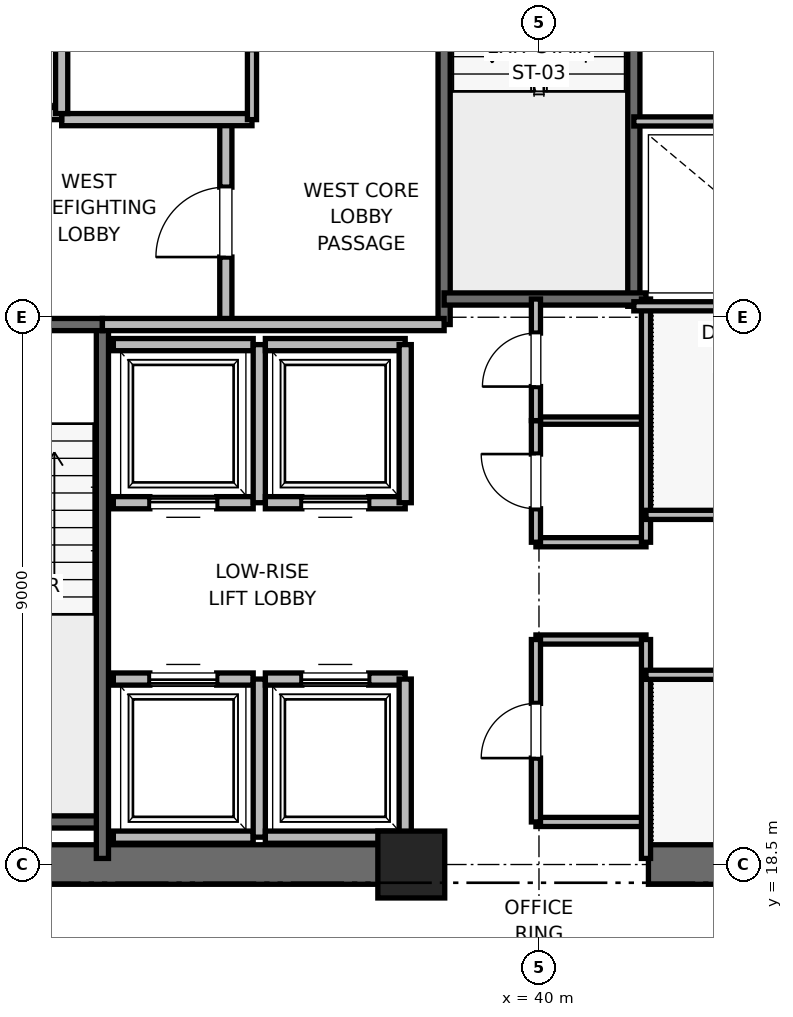
"""IFC4 building model, lengths in metres.
Left out: names, types, materials, properties, quantities, classifications, styles, units other than length and angle.
Written with IfcOpenShell. Run it as: python <this file> out.ifc"""

import sys

from ifc_helpers import new_model, si_unit, direction, frame, frame_2d, origin, origin_2d, place, context, subcontext, project, spatial, rectangle, extrude, element, fill, save


model = new_model("IFC4")
c1 = context("Model", 3, precision=1e-05, world=origin(), true_north=direction((0.0, 1.0)))
c2 = subcontext(c1, "Body", "Model", "MODEL_VIEW")
j1 = project(units=[si_unit("LENGTHUNIT", "METRE"), si_unit("PLANEANGLEUNIT", "RADIAN")], contexts=[c1])
p1 = place(None, origin())
s1 = spatial("IfcSite", under=j1, at=p1, CompositionType="ELEMENT")
p2 = place(p1, origin())
s2 = spatial("IfcBuilding", under=s1, at=p2, CompositionType="ELEMENT")
p3 = place(p2, frame((0.0, 0.0, 55.6)))
s3 = spatial("IfcBuildingStorey", under=s2, at=p3, CompositionType="ELEMENT", Elevation=55.6)
p4 = place(p3, frame((37.9, 18.5, 0.0), z_axis=(0.0, 0.0, 1.0), x_axis=(1.0, 0.0, 0.0)))
e1 = element("IfcColumn", 1, at=p4, inside=s3, PredefinedType="PILASTER", context=c2, shape_type="SweptSolid", body=[
    extrude(rectangle(XDim=1.1, YDim=1.1, at=origin_2d()), origin(), (0.0, 0.0, 1.0), 4.0),
])
for number, where, z_axis, x_axis in (
    (2, (29.0, 18.5, 0.0), (0.0, 0.0, 1.0), (1.0, 0.0, 0.0)),
    (3, (41.8, 18.5, 0.0), (0.0, 0.0, 1.0), (1.0, 0.0, 0.0)),
):
    element("IfcWall", number, at=place(p3, frame(where, z_axis=z_axis, x_axis=x_axis)), inside=s3, PredefinedType="SHEAR", context=c2, shape_type="SweptSolid", body=[
        extrude(rectangle(XDim=9.2, YDim=0.65, at=frame_2d((4.6, 0.0))), origin(), (0.0, 0.0, 1.0), 3.76),
    ])
p5 = place(p3, frame((29.7, 19.2, 0.0), z_axis=(0.0, 0.0, 1.0), x_axis=(1.0, 0.0, 0.0)))
e4 = element("IfcWall", 4, at=p5, inside=s3, PredefinedType="SOLIDWALL", context=c2, shape_type="SweptSolid", body=[
    extrude(rectangle(XDim=3.12, YDim=0.2, at=frame_2d((1.56, 0.0))), origin(), (0.0, 0.0, 1.0), 3.76),
])
p6 = place(p3, frame((32.82, 18.6, 0.0), z_axis=(0.0, 0.0, 1.0), x_axis=(0.0, 1.0, 0.0)))
e5 = element("IfcWall", 5, at=p6, inside=s3, PredefinedType="SOLIDWALL", context=c2, shape_type="SweptSolid", body=[
    extrude(rectangle(XDim=8.78, YDim=0.2, at=frame_2d((4.39, 0.0))), origin(), (0.0, 0.0, 1.0), 3.76),
])
p7 = place(p3, frame((29.7, 27.38, 0.0), z_axis=(0.0, 0.0, 1.0), x_axis=(1.0, 0.0, 0.0)))
e6 = element("IfcWall", 6, at=p7, inside=s3, PredefinedType="SOLIDWALL", context=c2, shape_type="SweptSolid", body=[
    extrude(rectangle(XDim=3.12, YDim=0.2, at=frame_2d((1.56, 0.0))), origin(), (0.0, 0.0, 1.0), 3.76),
])
p8 = place(p7, frame((1.01, 0.0, 0.0)))
e7 = element("IfcOpeningElement", 7, at=p8, cuts=e6, PredefinedType="OPENING", context=c2, shape_type="SweptSolid", body=[
    extrude(rectangle(XDim=1.1, YDim=2.15, at=frame_2d((0.55, 1.075))), frame((0.0, 0.1, 0.0), z_axis=(0.0, -1.0, 0.0), x_axis=(1.0, 0.0, 0.0)), (0.0, 0.0, 1.0), 0.2),
])
p9 = place(p3, frame((38.44, 27.38, 0.0), z_axis=(0.0, 0.0, 1.0), x_axis=(0.0, 1.0, 0.0)))
e8 = element("IfcWall", 8, at=p9, inside=s3, PredefinedType="SOLIDWALL", context=c2, shape_type="SweptSolid", body=[
    extrude(rectangle(XDim=8.87, YDim=0.2, at=frame_2d((4.435, 0.0))), origin(), (0.0, 0.0, 1.0), 3.76),
])
p10 = place(p3, frame((41.56, 27.68, 0.0), z_axis=(0.0, 0.0, 1.0), x_axis=(0.0, 1.0, 0.0)))
e9 = element("IfcWall", 9, at=p10, inside=s3, PredefinedType="SOLIDWALL", context=c2, shape_type="SweptSolid", body=[
    extrude(rectangle(XDim=8.57, YDim=0.2, at=frame_2d((4.285, 0.0))), origin(), (0.0, 0.0, 1.0), 3.76),
])
p11 = place(p3, frame((38.44, 27.8, 0.0), z_axis=(0.0, 0.0, 1.0), x_axis=(1.0, 0.0, 0.0)))
e10 = element("IfcWall", 10, at=p11, inside=s3, PredefinedType="SOLIDWALL", context=c2, shape_type="SweptSolid", body=[
    extrude(rectangle(XDim=3.32, YDim=0.2, at=frame_2d((1.66, 0.0))), origin(), (0.0, 0.0, 1.0), 3.76),
])
p12 = place(p3, frame((34.85, 27.38, 0.0), z_axis=(0.0, 0.0, 1.0), x_axis=(0.0, 1.0, 0.0)))
e11 = element("IfcWall", 11, at=p12, inside=s3, PredefinedType="PARTITIONING", context=c2, shape_type="SweptSolid", body=[
    extrude(rectangle(XDim=3.37, YDim=0.2, at=frame_2d((1.685, 0.0))), origin(), (0.0, 0.0, 1.0), 3.76),
])
p13 = place(p12, frame((1.11, 0.0, 0.0)))
e12 = element("IfcOpeningElement", 12, at=p13, cuts=e11, PredefinedType="OPENING", context=c2, shape_type="SweptSolid", body=[
    extrude(rectangle(XDim=1.15, YDim=2.2, at=frame_2d((0.575, 1.1))), frame((0.0, 0.1, 0.0), z_axis=(0.0, -1.0, 0.0), x_axis=(1.0, 0.0, 0.0)), (0.0, 0.0, 1.0), 0.2),
])
p14 = place(p3, frame((32.82, 27.38, 0.0), z_axis=(0.0, 0.0, 1.0), x_axis=(1.0, 0.0, 0.0)))
e13 = element("IfcWall", 13, at=p14, inside=s3, PredefinedType="PARTITIONING", context=c2, shape_type="SweptSolid", body=[
    extrude(rectangle(XDim=5.62, YDim=0.2, at=frame_2d((2.81, 0.0))), origin(), (0.0, 0.0, 1.0), 3.76),
])
p15 = place(p3, frame((32.15, 30.75, 0.0), z_axis=(0.0, 0.0, 1.0), x_axis=(1.0, 0.0, 0.0)))
e14 = element("IfcWall", 14, at=p15, inside=s3, PredefinedType="PARTITIONING", context=c2, shape_type="SweptSolid", body=[
    extrude(rectangle(XDim=3.13, YDim=0.2, at=frame_2d((1.565, 0.0))), origin(), (0.0, 0.0, 1.0), 3.76),
])
p16 = place(p3, frame((29.55, 30.85, 0.0), z_axis=(0.0, 0.0, 1.0), x_axis=(1.0, 0.0, 0.0)))
e15 = element("IfcWall", 15, at=p16, inside=s3, PredefinedType="SOLIDWALL", context=c2, shape_type="SweptSolid", body=[
    extrude(rectangle(XDim=2.6, YDim=0.2, at=frame_2d((1.3, 0.0))), origin(), (0.0, 0.0, 1.0), 2.54),
])
p17 = place(p16, frame((0.75, 0.0, 0.0)))
e16 = element("IfcOpeningElement", 16, at=p17, cuts=e15, PredefinedType="OPENING", context=c2, shape_type="SweptSolid", body=[
    extrude(rectangle(XDim=1.1, YDim=2.2, at=frame_2d((0.55, 1.1))), frame((0.0, 0.1, 0.0), z_axis=(0.0, -1.0, 0.0), x_axis=(1.0, 0.0, 0.0)), (0.0, 0.0, 1.0), 0.2),
])
p18 = place(p3, frame((32.15, 30.85, 0.0), z_axis=(0.0, 0.0, 1.0), x_axis=(0.0, 1.0, 0.0)))
e17 = element("IfcWall", 17, at=p18, inside=s3, PredefinedType="SOLIDWALL", context=c2, shape_type="SweptSolid", body=[
    extrude(rectangle(XDim=3.0, YDim=0.2, at=frame_2d((1.5, 0.0))), origin(), (0.0, 0.0, 1.0), 3.76),
])
p19 = place(p3, frame((33.0, 18.95, 0.0), z_axis=(0.0, 0.0, 1.0), x_axis=(1.0, 0.0, 0.0)))
e18 = element("IfcWall", 18, at=p19, inside=s3, PredefinedType="SOLIDWALL", context=c2, shape_type="SweptSolid", body=[
    extrude(rectangle(XDim=2.3, YDim=0.2, at=frame_2d((1.15, 0.0))), origin(), (0.0, 0.0, 1.0), 3.76),
])
p20 = place(p3, frame((35.3, 21.55, 0.0), z_axis=(0.0, 0.0, 1.0), x_axis=(-1.0, 0.0, 0.0)))
e19 = element("IfcWall", 19, at=p20, inside=s3, PredefinedType="SOLIDWALL", context=c2, shape_type="SweptSolid", body=[
    extrude(rectangle(XDim=2.3, YDim=0.2, at=frame_2d((1.15, 0.0))), origin(), (0.0, 0.0, 1.0), 3.76),
])
p21 = place(p20, frame((0.6, 0.0, 0.0)))
e20 = element("IfcOpeningElement", 20, at=p21, cuts=e19, PredefinedType="OPENING", context=c2, shape_type="SweptSolid", body=[
    extrude(rectangle(XDim=1.1, YDim=2.2, at=frame_2d((0.55, 1.1))), frame((0.0, 0.1, 0.0), z_axis=(0.0, -1.0, 0.0), x_axis=(1.0, 0.0, 0.0)), (0.0, 0.0, 1.0), 0.2),
])
p22 = place(p3, frame((35.4, 18.95, 0.0), z_axis=(0.0, 0.0, 1.0), x_axis=(0.0, 1.0, 0.0)))
e21 = element("IfcWall", 21, at=p22, inside=s3, PredefinedType="SOLIDWALL", context=c2, shape_type="SweptSolid", body=[
    extrude(rectangle(XDim=2.6, YDim=0.2, at=frame_2d((1.3, 0.0))), origin(), (0.0, 0.0, 1.0), 3.76),
])
p23 = place(p3, frame((35.5, 18.95, 0.0), z_axis=(0.0, 0.0, 1.0), x_axis=(1.0, 0.0, 0.0)))
e22 = element("IfcWall", 22, at=p23, inside=s3, PredefinedType="SOLIDWALL", context=c2, shape_type="SweptSolid", body=[
    extrude(rectangle(XDim=2.3, YDim=0.2, at=frame_2d((1.15, 0.0))), origin(), (0.0, 0.0, 1.0), 2.54),
])
p24 = place(p3, frame((37.8, 21.55, 0.0), z_axis=(0.0, 0.0, 1.0), x_axis=(-1.0, 0.0, 0.0)))
e23 = element("IfcWall", 23, at=p24, inside=s3, PredefinedType="SOLIDWALL", context=c2, shape_type="SweptSolid", body=[
    extrude(rectangle(XDim=2.3, YDim=0.2, at=frame_2d((1.15, 0.0))), origin(), (0.0, 0.0, 1.0), 3.76),
])
p25 = place(p24, frame((0.6, 0.0, 0.0)))
e24 = element("IfcOpeningElement", 24, at=p25, cuts=e23, PredefinedType="OPENING", context=c2, shape_type="SweptSolid", body=[
    extrude(rectangle(XDim=1.1, YDim=2.2, at=frame_2d((0.55, 1.1))), frame((0.0, 0.1, 0.0), z_axis=(0.0, -1.0, 0.0), x_axis=(1.0, 0.0, 0.0)), (0.0, 0.0, 1.0), 0.2),
])
p26 = place(p3, frame((37.8, 18.95, 0.0), z_axis=(0.0, 0.0, 1.0), x_axis=(0.0, 1.0, 0.0)))
e25 = element("IfcWall", 25, at=p26, inside=s3, PredefinedType="SOLIDWALL", context=c2, shape_type="SweptSolid", body=[
    extrude(rectangle(XDim=2.6, YDim=0.2, at=frame_2d((1.3, 0.0))), origin(), (0.0, 0.0, 1.0), 2.54),
])
p27 = place(p3, frame((33.0, 24.45, 0.0), z_axis=(0.0, 0.0, 1.0), x_axis=(1.0, 0.0, 0.0)))
e26 = element("IfcWall", 26, at=p27, inside=s3, PredefinedType="SOLIDWALL", context=c2, shape_type="SweptSolid", body=[
    extrude(rectangle(XDim=2.3, YDim=0.2, at=frame_2d((1.15, 0.0))), origin(), (0.0, 0.0, 1.0), 3.76),
])
p28 = place(p27, frame((0.6, 0.0, 0.0)))
e27 = element("IfcOpeningElement", 27, at=p28, cuts=e26, PredefinedType="OPENING", context=c2, shape_type="SweptSolid", body=[
    extrude(rectangle(XDim=1.1, YDim=2.2, at=frame_2d((0.55, 1.1))), frame((0.0, 0.1, 0.0), z_axis=(0.0, -1.0, 0.0), x_axis=(1.0, 0.0, 0.0)), (0.0, 0.0, 1.0), 0.2),
])
p29 = place(p3, frame((35.3, 27.05, 0.0), z_axis=(0.0, 0.0, 1.0), x_axis=(-1.0, 0.0, 0.0)))
e28 = element("IfcWall", 28, at=p29, inside=s3, PredefinedType="SOLIDWALL", context=c2, shape_type="SweptSolid", body=[
    extrude(rectangle(XDim=2.3, YDim=0.2, at=frame_2d((1.15, 0.0))), origin(), (0.0, 0.0, 1.0), 3.76),
])
p30 = place(p3, frame((35.4, 24.45, 0.0), z_axis=(0.0, 0.0, 1.0), x_axis=(0.0, 1.0, 0.0)))
e29 = element("IfcWall", 29, at=p30, inside=s3, PredefinedType="SOLIDWALL", context=c2, shape_type="SweptSolid", body=[
    extrude(rectangle(XDim=2.6, YDim=0.2, at=frame_2d((1.3, 0.0))), origin(), (0.0, 0.0, 1.0), 3.76),
])
p31 = place(p3, frame((35.5, 24.45, 0.0), z_axis=(0.0, 0.0, 1.0), x_axis=(1.0, 0.0, 0.0)))
e30 = element("IfcWall", 30, at=p31, inside=s3, PredefinedType="SOLIDWALL", context=c2, shape_type="SweptSolid", body=[
    extrude(rectangle(XDim=2.3, YDim=0.2, at=frame_2d((1.15, 0.0))), origin(), (0.0, 0.0, 1.0), 3.76),
])
p32 = place(p31, frame((0.6, 0.0, 0.0)))
e31 = element("IfcOpeningElement", 31, at=p32, cuts=e30, PredefinedType="OPENING", context=c2, shape_type="SweptSolid", body=[
    extrude(rectangle(XDim=1.1, YDim=2.2, at=frame_2d((0.55, 1.1))), frame((0.0, 0.1, 0.0), z_axis=(0.0, -1.0, 0.0), x_axis=(1.0, 0.0, 0.0)), (0.0, 0.0, 1.0), 0.2),
])
p33 = place(p3, frame((37.8, 27.05, 0.0), z_axis=(0.0, 0.0, 1.0), x_axis=(-1.0, 0.0, 0.0)))
e32 = element("IfcWall", 32, at=p33, inside=s3, PredefinedType="SOLIDWALL", context=c2, shape_type="SweptSolid", body=[
    extrude(rectangle(XDim=2.3, YDim=0.2, at=frame_2d((1.15, 0.0))), origin(), (0.0, 0.0, 1.0), 3.76),
])
p34 = place(p3, frame((37.8, 24.45, 0.0), z_axis=(0.0, 0.0, 1.0), x_axis=(0.0, 1.0, 0.0)))
e33 = element("IfcWall", 33, at=p34, inside=s3, PredefinedType="SOLIDWALL", context=c2, shape_type="SweptSolid", body=[
    extrude(rectangle(XDim=2.6, YDim=0.2, at=frame_2d((1.3, 0.0))), origin(), (0.0, 0.0, 1.0), 3.76),
])
for number, where, z_axis, x_axis in (
    (34, (39.95, 19.2, 0.0), (0.0, 0.0, 1.0), (1.0, 0.0, 0.0)),
    (35, (39.95, 22.2, 0.0), (0.0, 0.0, 1.0), (1.0, 0.0, 0.0)),
    (36, (39.95, 23.8, 0.0), (0.0, 0.0, 1.0), (1.0, 0.0, 0.0)),
):
    element("IfcWall", number, at=place(p3, frame(where, z_axis=z_axis, x_axis=x_axis)), inside=s3, PredefinedType="PARTITIONING", context=c2, shape_type="SweptSolid", body=[
        extrude(rectangle(XDim=1.81, YDim=0.15, at=frame_2d((0.905, 0.0))), origin(), (0.0, 0.0, 1.0), 2.85),
    ])
p35 = place(p3, frame((39.95, 25.8, 0.0), z_axis=(0.0, 0.0, 1.0), x_axis=(1.0, 0.0, 0.0)))
e37 = element("IfcWall", 37, at=p35, inside=s3, PredefinedType="PARTITIONING", context=c2, shape_type="SweptSolid", body=[
    extrude(rectangle(XDim=1.81, YDim=0.12, at=frame_2d((0.905, 0.0))), origin(), (0.0, 0.0, 1.0), 2.85),
])
p36 = place(p3, frame((41.76, 18.6, 0.0), z_axis=(0.0, 0.0, 1.0), x_axis=(0.0, 1.0, 0.0)))
e38 = element("IfcWall", 38, at=p36, inside=s3, PredefinedType="PARTITIONING", context=c2, shape_type="SweptSolid", body=[
    extrude(rectangle(XDim=3.6, YDim=0.15, at=frame_2d((1.8, 0.0))), origin(), (0.0, 0.0, 1.0), 2.54),
])
p37 = place(p3, frame((41.76, 23.8, 0.0), z_axis=(0.0, 0.0, 1.0), x_axis=(0.0, 1.0, 0.0)))
e39 = element("IfcWall", 39, at=p37, inside=s3, PredefinedType="PARTITIONING", context=c2, shape_type="SweptSolid", body=[
    extrude(rectangle(XDim=4.0, YDim=0.15, at=frame_2d((2.0, 0.0))), origin(), (0.0, 0.0, 1.0), 2.85),
])
p38 = place(p3, frame((39.95, 19.2, 0.0), z_axis=(0.0, 0.0, 1.0), x_axis=(0.0, 1.0, 0.0)))
e40 = element("IfcWall", 40, at=p38, inside=s3, PredefinedType="PARTITIONING", context=c2, shape_type="SweptSolid", body=[
    extrude(rectangle(XDim=3.0, YDim=0.15, at=frame_2d((1.5, 0.0))), origin(), (0.0, 0.0, 1.0), 2.85),
])
p39 = place(p38, frame((1.05, 0.0, 0.0)))
e41 = element("IfcOpeningElement", 41, at=p39, cuts=e40, PredefinedType="OPENING", context=c2, shape_type="SweptSolid", body=[
    extrude(rectangle(XDim=0.9, YDim=2.1, at=frame_2d((0.45, 1.05))), frame((0.0, 0.075, 0.0), z_axis=(0.0, -1.0, 0.0), x_axis=(1.0, 0.0, 0.0)), (0.0, 0.0, 1.0), 0.15),
])
p40 = place(p3, frame((39.95, 23.8, 0.0), z_axis=(0.0, 0.0, 1.0), x_axis=(0.0, 1.0, 0.0)))
e42 = element("IfcWall", 42, at=p40, inside=s3, PredefinedType="PARTITIONING", context=c2, shape_type="SweptSolid", body=[
    extrude(rectangle(XDim=2.0, YDim=0.15, at=frame_2d((1.0, 0.0))), origin(), (0.0, 0.0, 1.0), 2.85),
])
p41 = place(p40, frame((0.55, 0.0, 0.0)))
e43 = element("IfcOpeningElement", 43, at=p41, cuts=e42, PredefinedType="OPENING", context=c2, shape_type="SweptSolid", body=[
    extrude(rectangle(XDim=0.9, YDim=2.1, at=frame_2d((0.45, 1.05))), frame((0.0, 0.075, 0.0), z_axis=(0.0, -1.0, 0.0), x_axis=(1.0, 0.0, 0.0)), (0.0, 0.0, 1.0), 0.15),
])
p42 = place(p3, frame((39.95, 25.8, 0.0), z_axis=(0.0, 0.0, 1.0), x_axis=(0.0, 1.0, 0.0)))
e44 = element("IfcWall", 44, at=p42, inside=s3, PredefinedType="PARTITIONING", context=c2, shape_type="SweptSolid", body=[
    extrude(rectangle(XDim=2.0, YDim=0.15, at=frame_2d((1.0, 0.0))), origin(), (0.0, 0.0, 1.0), 2.85),
])
p43 = place(p42, frame((0.56, 0.0, 0.0)))
e45 = element("IfcOpeningElement", 45, at=p43, cuts=e44, PredefinedType="OPENING", context=c2, shape_type="SweptSolid", body=[
    extrude(rectangle(XDim=0.88, YDim=2.1, at=frame_2d((0.44, 1.05))), frame((0.0, 0.075, 0.0), z_axis=(0.0, -1.0, 0.0), x_axis=(1.0, 0.0, 0.0)), (0.0, 0.0, 1.0), 0.15),
])
p44 = place(p3, frame((35.28, 30.75, 0.0), z_axis=(0.0, 0.0, 1.0), x_axis=(0.0, 1.0, 0.0)))
e46 = element("IfcWall", 46, at=p44, inside=s3, PredefinedType="PARTITIONING", context=c2, shape_type="SweptSolid", body=[
    extrude(rectangle(XDim=3.2, YDim=0.15, at=frame_2d((1.6, 0.0))), origin(), (0.0, 0.0, 1.0), 2.85),
])
p45 = place(p44, frame((1.15, 0.0, 0.0)))
e47 = element("IfcOpeningElement", 47, at=p45, cuts=e46, PredefinedType="OPENING", context=c2, shape_type="SweptSolid", body=[
    extrude(rectangle(XDim=0.9, YDim=2.1, at=frame_2d((0.45, 1.05))), frame((0.0, 0.075, 0.0), z_axis=(0.0, -1.0, 0.0), x_axis=(1.0, 0.0, 0.0)), (0.0, 0.0, 1.0), 0.15),
])
p46 = place(p3, frame((41.56, 27.68, 0.0), z_axis=(0.0, 0.0, 1.0), x_axis=(1.0, 0.0, 0.0)))
e48 = element("IfcWall", 48, at=p46, inside=s3, PredefinedType="PARTITIONING", context=c2, shape_type="SweptSolid", body=[
    extrude(rectangle(XDim=3.59, YDim=0.15, at=frame_2d((1.795, 0.0))), origin(), (0.0, 0.0, 1.0), 2.85),
])
p47 = place(p3, frame((41.76, 21.62, 0.0), z_axis=(0.0, 0.0, 1.0), x_axis=(1.0, 0.0, 0.0)))
e49 = element("IfcWall", 49, at=p47, inside=s3, PredefinedType="PARTITIONING", context=c2, shape_type="SweptSolid", body=[
    extrude(rectangle(XDim=5.98, YDim=0.15, at=frame_2d((2.99, 0.0))), origin(), (0.0, 0.0, 1.0), 2.85),
])
p48 = place(p47, frame((2.49, 0.0, 0.0)))
e50 = element("IfcOpeningElement", 50, at=p48, cuts=e49, PredefinedType="OPENING", context=c2, shape_type="SweptSolid", body=[
    extrude(rectangle(XDim=1.0, YDim=2.15, at=frame_2d((0.5, 1.075))), frame((0.0, 0.075, 0.0), z_axis=(0.0, -1.0, 0.0), x_axis=(1.0, 0.0, 0.0)), (0.0, 0.0, 1.0), 0.15),
])
p49 = place(p3, frame((41.76, 24.25, 0.0), z_axis=(0.0, 0.0, 1.0), x_axis=(1.0, 0.0, 0.0)))
e51 = element("IfcWall", 51, at=p49, inside=s3, PredefinedType="PARTITIONING", context=c2, shape_type="SweptSolid", body=[
    extrude(rectangle(XDim=3.39, YDim=0.15, at=frame_2d((1.695, 0.0))), origin(), (0.0, 0.0, 1.0), 2.85),
])
p50 = place(p49, frame((1.195, 0.0, 0.0)))
e52 = element("IfcOpeningElement", 52, at=p50, cuts=e51, PredefinedType="OPENING", context=c2, shape_type="SweptSolid", body=[
    extrude(rectangle(XDim=1.0, YDim=2.15, at=frame_2d((0.5, 1.075))), frame((0.0, 0.075, 0.0), z_axis=(0.0, -1.0, 0.0), x_axis=(1.0, 0.0, 0.0)), (0.0, 0.0, 1.0), 0.15),
])
p51 = place(p3, frame((41.56, 30.72, 0.0), z_axis=(0.0, 0.0, 1.0), x_axis=(1.0, 0.0, 0.0)))
e53 = element("IfcWall", 53, at=p51, inside=s3, PredefinedType="PARTITIONING", context=c2, shape_type="SweptSolid", body=[
    extrude(rectangle(XDim=3.59, YDim=0.15, at=frame_2d((1.795, 0.0))), origin(), (0.0, 0.0, 1.0), 2.85),
])
p52 = place(p51, frame((1.355, 0.0, 0.0)))
e54 = element("IfcOpeningElement", 54, at=p52, cuts=e53, PredefinedType="OPENING", context=c2, shape_type="SweptSolid", body=[
    extrude(rectangle(XDim=0.88, YDim=2.1, at=frame_2d((0.44, 1.05))), frame((0.0, 0.075, 0.0), z_axis=(0.0, -1.0, 0.0), x_axis=(1.0, 0.0, 0.0)), (0.0, 0.0, 1.0), 0.15),
])
p53 = place(p13, origin())
e55 = element("IfcDoor", 55, at=p53, inside=s3, OperationType="SINGLE_SWING_LEFT", PredefinedType="DOOR", context=c2, shape_type="SweptSolid", body=[
    extrude(rectangle(XDim=1.15, YDim=2.2, at=frame_2d((0.575, 1.1))), frame((0.0, 0.025, 0.0), z_axis=(0.0, -1.0, 0.0), x_axis=(1.0, 0.0, 0.0)), (0.0, 0.0, 1.0), 0.05),
])
fill(e12, e55)
p54 = place(p21, origin())
e56 = element("IfcDoor", 56, at=p54, inside=s3, OperationType="SLIDING_TO_RIGHT", PredefinedType="DOOR", context=c2, shape_type="SweptSolid", body=[
    extrude(rectangle(XDim=1.1, YDim=2.2, at=frame_2d((0.55, 1.1))), frame((0.0, 0.025, 0.0), z_axis=(0.0, -1.0, 0.0), x_axis=(1.0, 0.0, 0.0)), (0.0, 0.0, 1.0), 0.05),
])
fill(e20, e56)
p55 = place(p25, origin())
e57 = element("IfcDoor", 57, at=p55, inside=s3, OperationType="SLIDING_TO_RIGHT", PredefinedType="DOOR", context=c2, shape_type="SweptSolid", body=[
    extrude(rectangle(XDim=1.1, YDim=2.2, at=frame_2d((0.55, 1.1))), frame((0.0, 0.025, 0.0), z_axis=(0.0, -1.0, 0.0), x_axis=(1.0, 0.0, 0.0)), (0.0, 0.0, 1.0), 0.05),
])
fill(e24, e57)
p56 = place(p28, origin())
e58 = element("IfcDoor", 58, at=p56, inside=s3, OperationType="SLIDING_TO_RIGHT", PredefinedType="DOOR", context=c2, shape_type="SweptSolid", body=[
    extrude(rectangle(XDim=1.1, YDim=2.2, at=frame_2d((0.55, 1.1))), frame((0.0, 0.025, 0.0), z_axis=(0.0, -1.0, 0.0), x_axis=(1.0, 0.0, 0.0)), (0.0, 0.0, 1.0), 0.05),
])
fill(e27, e58)
p57 = place(p32, origin())
e59 = element("IfcDoor", 59, at=p57, inside=s3, OperationType="SLIDING_TO_RIGHT", PredefinedType="DOOR", context=c2, shape_type="SweptSolid", body=[
    extrude(rectangle(XDim=1.1, YDim=2.2, at=frame_2d((0.55, 1.1))), frame((0.0, 0.025, 0.0), z_axis=(0.0, -1.0, 0.0), x_axis=(1.0, 0.0, 0.0)), (0.0, 0.0, 1.0), 0.05),
])
fill(e31, e59)
p58 = place(p39, origin())
e60 = element("IfcDoor", 60, at=p58, inside=s3, OperationType="SINGLE_SWING_LEFT", PredefinedType="DOOR", context=c2, shape_type="SweptSolid", body=[
    extrude(rectangle(XDim=0.9, YDim=2.1, at=frame_2d((0.45, 1.05))), frame((0.0, 0.025, 0.0), z_axis=(0.0, -1.0, 0.0), x_axis=(1.0, 0.0, 0.0)), (0.0, 0.0, 1.0), 0.05),
])
fill(e41, e60)
p59 = place(p41, origin())
e61 = element("IfcDoor", 61, at=p59, inside=s3, OperationType="SINGLE_SWING_RIGHT", PredefinedType="DOOR", context=c2, shape_type="SweptSolid", body=[
    extrude(rectangle(XDim=0.9, YDim=2.1, at=frame_2d((0.45, 1.05))), frame((0.0, 0.025, 0.0), z_axis=(0.0, -1.0, 0.0), x_axis=(1.0, 0.0, 0.0)), (0.0, 0.0, 1.0), 0.05),
])
fill(e43, e61)
p60 = place(p43, origin())
e62 = element("IfcDoor", 62, at=p60, inside=s3, OperationType="SINGLE_SWING_LEFT", PredefinedType="DOOR", context=c2, shape_type="SweptSolid", body=[
    extrude(rectangle(XDim=0.88, YDim=2.1, at=frame_2d((0.44, 1.05))), frame((0.0, 0.025, 0.0), z_axis=(0.0, -1.0, 0.0), x_axis=(1.0, 0.0, 0.0)), (0.0, 0.0, 1.0), 0.05),
])
fill(e45, e62)
save(model, sys.argv[1])
